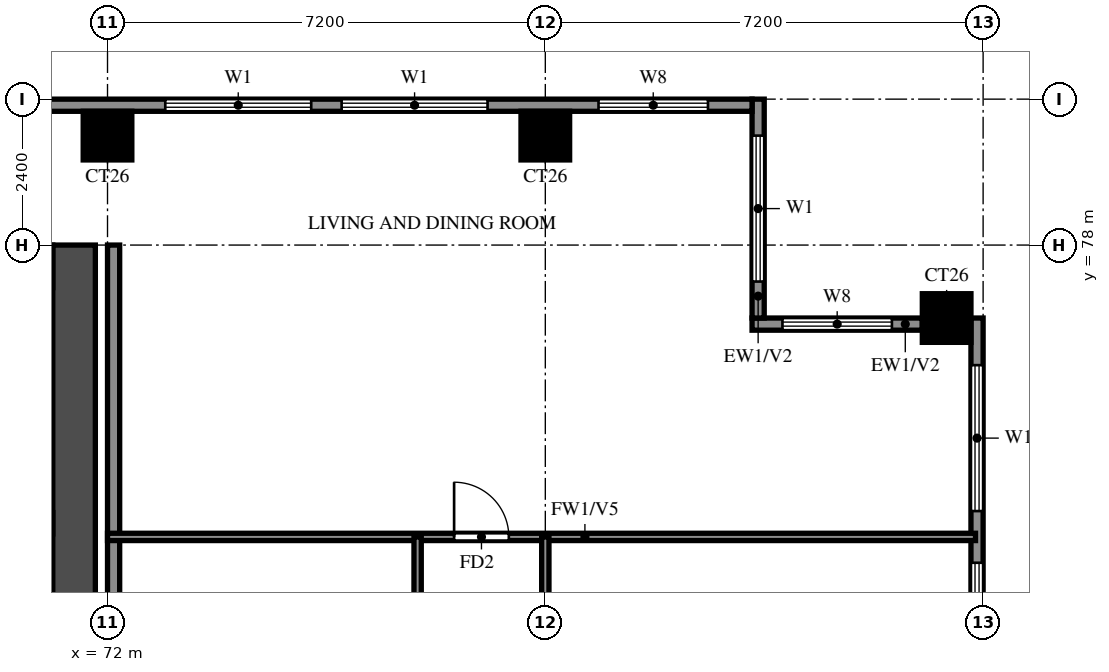
"""IFC4 building model, lengths in metres.
Left out: names, types, materials, properties, quantities, classifications, styles, units other than length and angle.
Written with IfcOpenShell. Run it as: python <this file> out.ifc"""

import sys

from ifc_helpers import new_model, si_unit, direction, frame, frame_2d, origin, origin_2d, place, context, subcontext, project, spatial, rectangle, extrude, source, transform, mapped, element, fill, save


model = new_model("IFC4")
c1 = context("Model", 3, precision=1e-05, world=origin(), true_north=direction((0.0, 1.0)))
c2 = subcontext(c1, "Body", "Model", "MODEL_VIEW")
j1 = project(units=[si_unit("LENGTHUNIT", "METRE"), si_unit("PLANEANGLEUNIT", "RADIAN")], contexts=[c1])
p1 = place(None, origin())
s1 = spatial("IfcSite", under=j1, at=p1, CompositionType="ELEMENT")
p2 = place(p1, origin())
s2 = spatial("IfcBuilding", under=s1, at=p2, CompositionType="ELEMENT")
p3 = place(p2, frame((0.0, 0.0, 199.0)))
s3 = spatial("IfcBuildingStorey", under=s2, at=p3, CompositionType="ELEMENT", Elevation=199.0)
m1 = source(origin(), c2, "Body", "SweptSolid", [
    extrude(rectangle(XDim=0.8, YDim=0.8, at=origin_2d()), origin(), (0.0, 0.0, 1.0), 3.2),
])
for number, where, z_axis, x_axis in (
    (1, (85.8, 76.8, 0.0), (0.0, 0.0, 1.0), (1.0, 0.0, 0.0)),
    (2, (72.0, 79.8, 0.0), (0.0, 0.0, 1.0), (1.0, 0.0, 0.0)),
    (3, (79.2, 79.8, 0.0), (0.0, 0.0, 1.0), (1.0, 0.0, 0.0)),
):
    element("IfcColumn", number, at=place(p3, frame(where, z_axis=z_axis, x_axis=x_axis)), inside=s3, PredefinedType="COLUMN", context=c2, shape_type="MappedRepresentation", body=[
        mapped(m1, transform((0.0, 0.0, 0.0))),
    ])
p4 = place(p3, frame((71.45, 66.1, 0.0), z_axis=(0.0, 0.0, 1.0), x_axis=(0.0, 1.0, 0.0)))
e4 = element("IfcWall", 4, at=p4, inside=s3, PredefinedType="SHEAR", context=c2, shape_type="SweptSolid", body=[
    extrude(rectangle(XDim=11.9, YDim=0.7, at=frame_2d((5.95, 0.0))), origin(), (0.0, 0.0, 1.0), 3.2),
])
p5 = place(p3, frame((29.7, 77.65, 0.0), z_axis=(0.0, 0.0, 1.0), x_axis=(1.0, 0.0, 0.0)))
e5 = element("IfcWall", 5, at=p5, inside=s3, PredefinedType="SHEAR", context=c2, shape_type="SweptSolid", body=[
    extrude(rectangle(XDim=41.4, YDim=0.7, at=frame_2d((20.7, 0.0))), origin(), (0.0, 0.0, 1.0), 3.2),
])
p6 = place(p3, frame((86.3, 48.2, 0.0), z_axis=(0.0, 0.0, 1.0), x_axis=(0.0, 1.0, 0.0)))
e6 = element("IfcWall", 6, at=p6, inside=s3, PredefinedType="SOLIDWALL", context=c2, shape_type="SweptSolid", body=[
    extrude(rectangle(XDim=28.6, YDim=0.2, at=frame_2d((14.3, 0.0))), origin(), (0.0, 0.0, 1.0), 3.2),
])
p7 = place(p6, frame((11.5, 0.0, 0.0)))
e7 = element("IfcOpeningElement", 7, at=p7, cuts=e6, PredefinedType="OPENING", context=c2, shape_type="SweptSolid", body=[
    extrude(rectangle(XDim=1.8, YDim=2.4, at=frame_2d((0.9, 1.2))), frame((0.0, 0.11, 0.0), z_axis=(0.0, -1.0, 0.0), x_axis=(1.0, 0.0, 0.0)), (0.0, 0.0, 1.0), 0.22),
])
p8 = place(p6, frame((0.6, 0.0, 0.6)))
e8 = element("IfcOpeningElement", 8, at=p8, cuts=e6, PredefinedType="OPENING", context=c2, shape_type="SweptSolid", body=[
    extrude(rectangle(XDim=2.4, YDim=2.4, at=frame_2d((1.2, 1.2))), frame((0.0, 0.11, 0.0), z_axis=(0.0, -1.0, 0.0), x_axis=(1.0, 0.0, 0.0)), (0.0, 0.0, 1.0), 0.22),
])
p9 = place(p6, frame((4.575, 0.0, 1.5)))
e9 = element("IfcOpeningElement", 9, at=p9, cuts=e6, PredefinedType="OPENING", context=c2, shape_type="SweptSolid", body=[
    extrude(rectangle(XDim=0.9, YDim=0.9, at=frame_2d((0.45, 0.45))), frame((0.0, 0.11, 0.0), z_axis=(0.0, -1.0, 0.0), x_axis=(1.0, 0.0, 0.0)), (0.0, 0.0, 1.0), 0.22),
])
p10 = place(p6, frame((7.475, 0.0, 0.6)))
e10 = element("IfcOpeningElement", 10, at=p10, cuts=e6, PredefinedType="OPENING", context=c2, shape_type="SweptSolid", body=[
    extrude(rectangle(XDim=1.8, YDim=2.4, at=frame_2d((0.9, 1.2))), frame((0.0, 0.11, 0.0), z_axis=(0.0, -1.0, 0.0), x_axis=(1.0, 0.0, 0.0)), (0.0, 0.0, 1.0), 0.22),
])
p11 = place(p6, frame((10.15, 0.0, 0.6)))
e11 = element("IfcOpeningElement", 11, at=p11, cuts=e6, PredefinedType="OPENING", context=c2, shape_type="SweptSolid", body=[
    extrude(rectangle(XDim=0.9, YDim=2.4, at=frame_2d((0.45, 1.2))), frame((0.0, 0.11, 0.0), z_axis=(0.0, -1.0, 0.0), x_axis=(1.0, 0.0, 0.0)), (0.0, 0.0, 1.0), 0.22),
])
p12 = place(p6, frame((14.675, 0.0, 0.6)))
e12 = element("IfcOpeningElement", 12, at=p12, cuts=e6, PredefinedType="OPENING", context=c2, shape_type="SweptSolid", body=[
    extrude(rectangle(XDim=1.2, YDim=2.4, at=frame_2d((0.6, 1.2))), frame((0.0, 0.11, 0.0), z_axis=(0.0, -1.0, 0.0), x_axis=(1.0, 0.0, 0.0)), (0.0, 0.0, 1.0), 0.22),
])
p13 = place(p6, frame((16.75, 0.0, 0.6)))
e13 = element("IfcOpeningElement", 13, at=p13, cuts=e6, PredefinedType="OPENING", context=c2, shape_type="SweptSolid", body=[
    extrude(rectangle(XDim=0.9, YDim=2.4, at=frame_2d((0.45, 1.2))), frame((0.0, 0.11, 0.0), z_axis=(0.0, -1.0, 0.0), x_axis=(1.0, 0.0, 0.0)), (0.0, 0.0, 1.0), 0.22),
])
p14 = place(p6, frame((18.975, 0.0, 1.5)))
e14 = element("IfcOpeningElement", 14, at=p14, cuts=e6, PredefinedType="OPENING", context=c2, shape_type="SweptSolid", body=[
    extrude(rectangle(XDim=0.9, YDim=0.9, at=frame_2d((0.45, 0.45))), frame((0.0, 0.11, 0.0), z_axis=(0.0, -1.0, 0.0), x_axis=(1.0, 0.0, 0.0)), (0.0, 0.0, 1.0), 0.22),
])
p15 = place(p6, frame((22.175, 0.0, 0.6)))
e15 = element("IfcOpeningElement", 15, at=p15, cuts=e6, PredefinedType="OPENING", context=c2, shape_type="SweptSolid", body=[
    extrude(rectangle(XDim=2.4, YDim=2.4, at=frame_2d((1.2, 1.2))), frame((0.0, 0.11, 0.0), z_axis=(0.0, -1.0, 0.0), x_axis=(1.0, 0.0, 0.0)), (0.0, 0.0, 1.0), 0.22),
])
p16 = place(p6, frame((25.425, 0.0, 0.6)))
e16 = element("IfcOpeningElement", 16, at=p16, cuts=e6, PredefinedType="OPENING", context=c2, shape_type="SweptSolid", body=[
    extrude(rectangle(XDim=2.4, YDim=2.4, at=frame_2d((1.2, 1.2))), frame((0.0, 0.11, 0.0), z_axis=(0.0, -1.0, 0.0), x_axis=(1.0, 0.0, 0.0)), (0.0, 0.0, 1.0), 0.22),
])
p17 = place(p3, frame((85.4, 76.7, 0.0), z_axis=(0.0, 0.0, 1.0), x_axis=(-1.0, 0.0, 0.0)))
e17 = element("IfcWall", 17, at=p17, inside=s3, PredefinedType="SOLIDWALL", context=c2, shape_type="SweptSolid", body=[
    extrude(rectangle(XDim=2.8, YDim=0.2, at=frame_2d((1.4, 0.0))), origin(), (0.0, 0.0, 1.0), 3.2),
])
p18 = place(p17, frame((0.5, 0.0, 0.6)))
e18 = element("IfcOpeningElement", 18, at=p18, cuts=e17, PredefinedType="OPENING", context=c2, shape_type="SweptSolid", body=[
    extrude(rectangle(XDim=1.8, YDim=2.4, at=frame_2d((0.9, 1.2))), frame((0.0, 0.11, 0.0), z_axis=(0.0, -1.0, 0.0), x_axis=(1.0, 0.0, 0.0)), (0.0, 0.0, 1.0), 0.22),
])
p19 = place(p3, frame((82.7, 76.8, 0.0), z_axis=(0.0, 0.0, 1.0), x_axis=(0.0, 1.0, 0.0)))
e19 = element("IfcWall", 19, at=p19, inside=s3, PredefinedType="SOLIDWALL", context=c2, shape_type="SweptSolid", body=[
    extrude(rectangle(XDim=3.6, YDim=0.2, at=frame_2d((1.8, 0.0))), origin(), (0.0, 0.0, 1.0), 3.2),
])
p20 = place(p19, frame((0.6, 0.0, 0.6)))
e20 = element("IfcOpeningElement", 20, at=p20, cuts=e19, PredefinedType="OPENING", context=c2, shape_type="SweptSolid", body=[
    extrude(rectangle(XDim=2.4, YDim=2.4, at=frame_2d((1.2, 1.2))), frame((0.0, 0.11, 0.0), z_axis=(0.0, -1.0, 0.0), x_axis=(1.0, 0.0, 0.0)), (0.0, 0.0, 1.0), 0.22),
])
p21 = place(p3, frame((82.6, 80.3, 0.0), z_axis=(0.0, 0.0, 1.0), x_axis=(-1.0, 0.0, 0.0)))
e21 = element("IfcWall", 21, at=p21, inside=s3, PredefinedType="SOLIDWALL", context=c2, shape_type="SweptSolid", body=[
    extrude(rectangle(XDim=53.8, YDim=0.2, at=frame_2d((26.9, 0.0))), origin(), (0.0, 0.0, 1.0), 3.2),
])
p22 = place(p21, frame((0.725, 0.0, 0.6)))
e22 = element("IfcOpeningElement", 22, at=p22, cuts=e21, PredefinedType="OPENING", context=c2, shape_type="SweptSolid", body=[
    extrude(rectangle(XDim=1.8, YDim=2.4, at=frame_2d((0.9, 1.2))), frame((0.0, 0.11, 0.0), z_axis=(0.0, -1.0, 0.0), x_axis=(1.0, 0.0, 0.0)), (0.0, 0.0, 1.0), 0.22),
])
p23 = place(p21, frame((4.35, 0.0, 0.6)))
e23 = element("IfcOpeningElement", 23, at=p23, cuts=e21, PredefinedType="OPENING", context=c2, shape_type="SweptSolid", body=[
    extrude(rectangle(XDim=2.4, YDim=2.4, at=frame_2d((1.2, 1.2))), frame((0.0, 0.11, 0.0), z_axis=(0.0, -1.0, 0.0), x_axis=(1.0, 0.0, 0.0)), (0.0, 0.0, 1.0), 0.22),
])
p24 = place(p21, frame((7.25, 0.0, 0.6)))
e24 = element("IfcOpeningElement", 24, at=p24, cuts=e21, PredefinedType="OPENING", context=c2, shape_type="SweptSolid", body=[
    extrude(rectangle(XDim=2.4, YDim=2.4, at=frame_2d((1.2, 1.2))), frame((0.0, 0.11, 0.0), z_axis=(0.0, -1.0, 0.0), x_axis=(1.0, 0.0, 0.0)), (0.0, 0.0, 1.0), 0.22),
])
p25 = place(p3, frame((72.1, 62.4, 0.0), z_axis=(0.0, 0.0, 1.0), x_axis=(0.0, 1.0, 0.0)))
e25 = element("IfcWall", 25, at=p25, inside=s3, PredefinedType="SOLIDWALL", context=c2, shape_type="SweptSolid", body=[
    extrude(rectangle(XDim=15.6, YDim=0.2, at=frame_2d((7.8, 0.0))), origin(), (0.0, 0.0, 1.0), 3.2),
])
p26 = place(p3, frame((72.0, 73.2, 0.0), z_axis=(0.0, 0.0, 1.0), x_axis=(1.0, 0.0, 0.0)))
e26 = element("IfcWall", 26, at=p26, inside=s3, PredefinedType="PARTITIONING", context=c2, shape_type="SweptSolid", body=[
    extrude(rectangle(XDim=14.275, YDim=0.12, at=frame_2d((7.137, 0.0))), origin(), (0.0, 0.0, 1.0), 2.3),
])
p27 = place(p26, frame((5.7, 0.0, 0.0)))
e27 = element("IfcOpeningElement", 27, at=p27, cuts=e26, PredefinedType="OPENING", context=c2, shape_type="SweptSolid", body=[
    extrude(rectangle(XDim=0.9, YDim=2.1, at=frame_2d((0.45, 1.05))), frame((0.0, 0.07, 0.0), z_axis=(0.0, -1.0, 0.0), x_axis=(1.0, 0.0, 0.0)), (0.0, 0.0, 1.0), 0.14),
])
p28 = place(p3, frame((77.1, 64.8, 0.0), z_axis=(0.0, 0.0, 1.0), x_axis=(0.0, 1.0, 0.0)))
e28 = element("IfcWall", 28, at=p28, inside=s3, PredefinedType="PARTITIONING", context=c2, shape_type="SweptSolid", body=[
    extrude(rectangle(XDim=8.4, YDim=0.12, at=frame_2d((4.2, 0.0))), origin(), (0.0, 0.0, 1.0), 3.2),
])
p29 = place(p28, frame((6.125, 0.0, 0.0)))
e29 = element("IfcOpeningElement", 29, at=p29, cuts=e28, PredefinedType="OPENING", context=c2, shape_type="SweptSolid", body=[
    extrude(rectangle(XDim=0.8, YDim=2.1, at=frame_2d((0.4, 1.05))), frame((0.0, 0.07, 0.0), z_axis=(0.0, -1.0, 0.0), x_axis=(1.0, 0.0, 0.0)), (0.0, 0.0, 1.0), 0.14),
])
p30 = place(p3, frame((79.2, 69.6, 0.0), z_axis=(0.0, 0.0, 1.0), x_axis=(0.0, 1.0, 0.0)))
e30 = element("IfcWall", 30, at=p30, inside=s3, PredefinedType="PARTITIONING", context=c2, shape_type="SweptSolid", body=[
    extrude(rectangle(XDim=3.6, YDim=0.12, at=frame_2d((1.8, 0.0))), origin(), (0.0, 0.0, 1.0), 3.2),
])
p31 = place(p30, frame((1.35, 0.0, 0.0)))
e31 = element("IfcOpeningElement", 31, at=p31, cuts=e30, PredefinedType="OPENING", context=c2, shape_type="SweptSolid", body=[
    extrude(rectangle(XDim=0.9, YDim=2.1, at=frame_2d((0.45, 1.05))), frame((0.0, 0.07, 0.0), z_axis=(0.0, -1.0, 0.0), x_axis=(1.0, 0.0, 0.0)), (0.0, 0.0, 1.0), 0.14),
])
p32 = place(p15, origin())
e32 = element("IfcWindow", 32, at=p32, inside=s3, PartitioningType="DOUBLE_PANEL_VERTICAL", PredefinedType="WINDOW", context=c2, shape_type="SweptSolid", body=[
    extrude(rectangle(XDim=2.4, YDim=2.4, at=frame_2d((1.2, 1.2))), frame((0.0, 0.03, 0.0), z_axis=(0.0, -1.0, 0.0), x_axis=(1.0, 0.0, 0.0)), (0.0, 0.0, 1.0), 0.06),
])
fill(e15, e32)
p33 = place(p16, origin())
e33 = element("IfcWindow", 33, at=p33, inside=s3, PartitioningType="DOUBLE_PANEL_VERTICAL", PredefinedType="WINDOW", context=c2, shape_type="SweptSolid", body=[
    extrude(rectangle(XDim=2.4, YDim=2.4, at=frame_2d((1.2, 1.2))), frame((0.0, 0.03, 0.0), z_axis=(0.0, -1.0, 0.0), x_axis=(1.0, 0.0, 0.0)), (0.0, 0.0, 1.0), 0.06),
])
fill(e16, e33)
p34 = place(p18, origin())
e34 = element("IfcWindow", 34, at=p34, inside=s3, PartitioningType="DOUBLE_PANEL_VERTICAL", PredefinedType="WINDOW", context=c2, shape_type="SweptSolid", body=[
    extrude(rectangle(XDim=1.8, YDim=2.4, at=frame_2d((0.9, 1.2))), frame((0.0, 0.03, 0.0), z_axis=(0.0, -1.0, 0.0), x_axis=(1.0, 0.0, 0.0)), (0.0, 0.0, 1.0), 0.06),
])
fill(e18, e34)
p35 = place(p20, origin())
e35 = element("IfcWindow", 35, at=p35, inside=s3, PartitioningType="DOUBLE_PANEL_VERTICAL", PredefinedType="WINDOW", context=c2, shape_type="SweptSolid", body=[
    extrude(rectangle(XDim=2.4, YDim=2.4, at=frame_2d((1.2, 1.2))), frame((0.0, 0.03, 0.0), z_axis=(0.0, -1.0, 0.0), x_axis=(1.0, 0.0, 0.0)), (0.0, 0.0, 1.0), 0.06),
])
fill(e20, e35)
p36 = place(p22, origin())
e36 = element("IfcWindow", 36, at=p36, inside=s3, PartitioningType="DOUBLE_PANEL_VERTICAL", PredefinedType="WINDOW", context=c2, shape_type="SweptSolid", body=[
    extrude(rectangle(XDim=1.8, YDim=2.4, at=frame_2d((0.9, 1.2))), frame((0.0, 0.03, 0.0), z_axis=(0.0, -1.0, 0.0), x_axis=(1.0, 0.0, 0.0)), (0.0, 0.0, 1.0), 0.06),
])
fill(e22, e36)
p37 = place(p23, origin())
e37 = element("IfcWindow", 37, at=p37, inside=s3, PartitioningType="DOUBLE_PANEL_VERTICAL", PredefinedType="WINDOW", context=c2, shape_type="SweptSolid", body=[
    extrude(rectangle(XDim=2.4, YDim=2.4, at=frame_2d((1.2, 1.2))), frame((0.0, 0.03, 0.0), z_axis=(0.0, -1.0, 0.0), x_axis=(1.0, 0.0, 0.0)), (0.0, 0.0, 1.0), 0.06),
])
fill(e23, e37)
p38 = place(p24, origin())
e38 = element("IfcWindow", 38, at=p38, inside=s3, PartitioningType="DOUBLE_PANEL_VERTICAL", PredefinedType="WINDOW", context=c2, shape_type="SweptSolid", body=[
    extrude(rectangle(XDim=2.4, YDim=2.4, at=frame_2d((1.2, 1.2))), frame((0.0, 0.03, 0.0), z_axis=(0.0, -1.0, 0.0), x_axis=(1.0, 0.0, 0.0)), (0.0, 0.0, 1.0), 0.06),
])
fill(e24, e38)
p39 = place(p27, origin())
e39 = element("IfcDoor", 39, at=p39, inside=s3, OperationType="SINGLE_SWING_LEFT", PredefinedType="DOOR", context=c2, shape_type="SweptSolid", body=[
    extrude(rectangle(XDim=0.9, YDim=2.1, at=frame_2d((0.45, 1.05))), frame((0.0, 0.025, 0.0), z_axis=(0.0, -1.0, 0.0), x_axis=(1.0, 0.0, 0.0)), (0.0, 0.0, 1.0), 0.05),
])
fill(e27, e39)
save(model, sys.argv[1])
